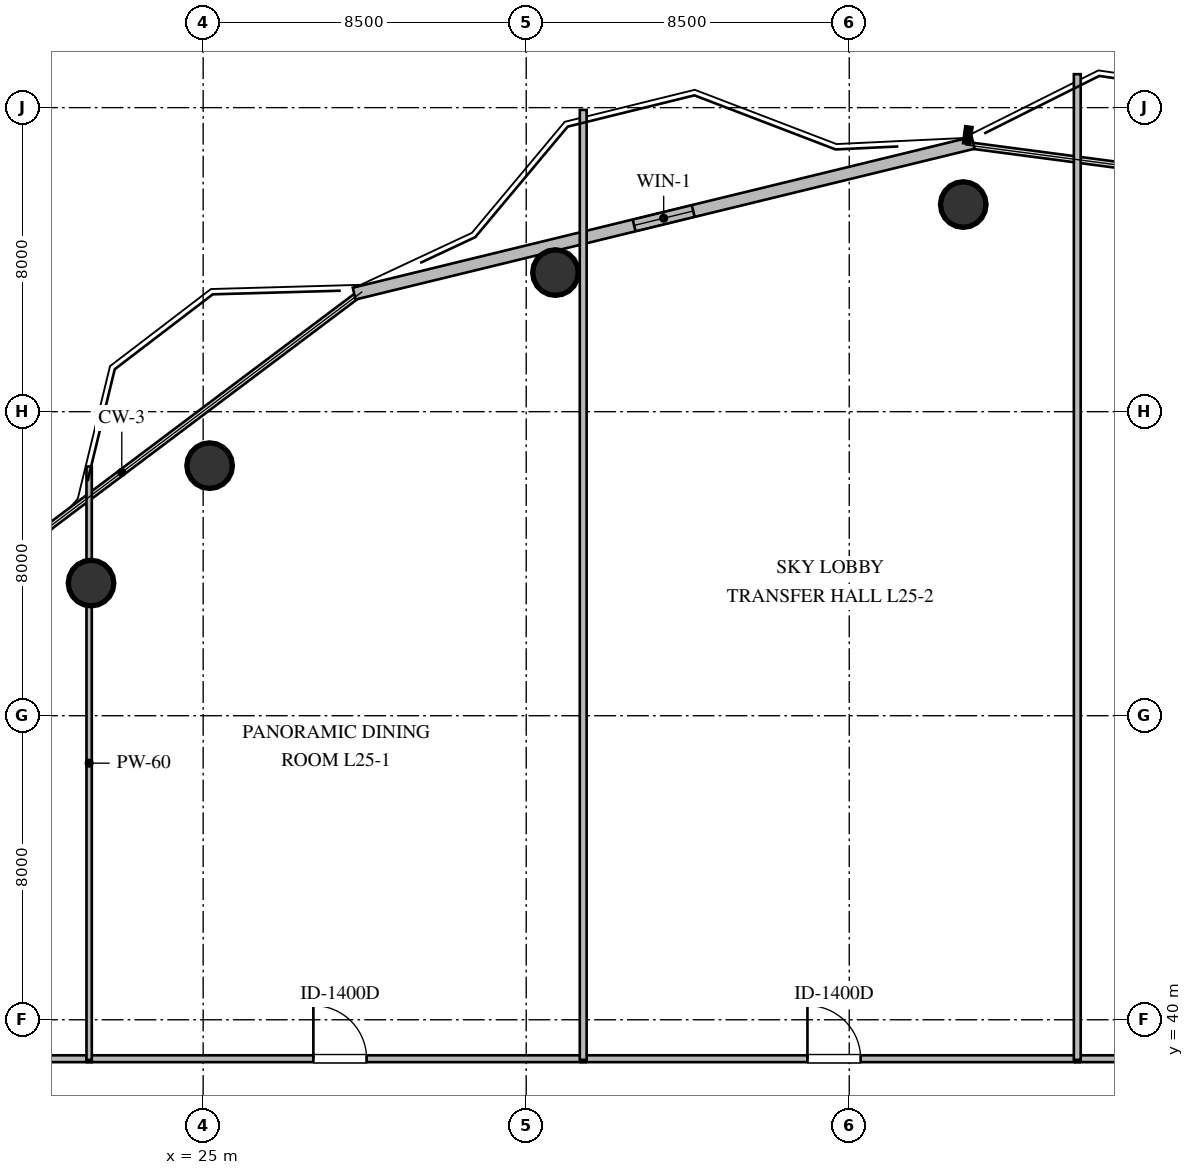
"""IFC4 building model, lengths in metres.
Left out: names, types, materials, properties, quantities, classifications, styles, units other than length and angle.
Written with IfcOpenShell. Run it as: python <this file> out.ifc"""

import sys

from ifc_helpers import new_model, si_unit, direction, frame, frame_2d, origin, origin_2d, place, context, subcontext, project, spatial, rectangle, circle, extrude, element, fill, save


model = new_model("IFC4")
c1 = context("Model", 3, precision=1e-05, world=origin(), true_north=direction((0.0, 1.0)))
c2 = subcontext(c1, "Body", "Model", "MODEL_VIEW")
j1 = project(units=[si_unit("LENGTHUNIT", "METRE"), si_unit("PLANEANGLEUNIT", "RADIAN")], contexts=[c1])
p1 = place(None, origin())
s1 = spatial("IfcSite", under=j1, at=p1, CompositionType="ELEMENT")
p2 = place(p1, origin())
s2 = spatial("IfcBuilding", under=s1, at=p2, CompositionType="ELEMENT")
p3 = place(p2, frame((0.0, 0.0, 97.8)))
s3 = spatial("IfcBuildingStorey", under=s2, at=p3, CompositionType="ELEMENT", Elevation=97.8)
for number, where, z_axis, x_axis in (
    (1, (45.0, 61.45, -0.32), (0.0, 0.0, 1.0), (1.0, 0.0, 0.0)),
    (2, (34.27, 59.66, -0.32), (0.0, 0.0, 1.0), (1.0, 0.0, 0.0)),
    (3, (25.17, 54.58, -0.32), (0.0, 0.0, 1.0), (1.0, 0.0, 0.0)),
    (4, (22.05, 51.49, -0.32), (0.0, 0.0, 1.0), (1.0, 0.0, 0.0)),
):
    element("IfcColumn", number, at=place(p3, frame(where, z_axis=z_axis, x_axis=x_axis)), inside=s3, PredefinedType="COLUMN", context=c2, shape_type="SweptSolid", body=[
        extrude(circle(Radius=0.6, at=origin_2d()), origin(), (0.0, 0.0, 1.0), 5.12),
    ])
p4 = place(p3, frame((28.974, 59.107, 0.0), z_axis=(0.0, 0.0, 1.0), x_axis=(0.971593971582, 0.236654081699, 0.0)))
e5 = element("IfcWall", 5, at=p4, inside=s3, PredefinedType="STANDARD", context=c2, shape_type="SweptSolid", body=[
    extrude(rectangle(XDim=16.763, YDim=0.32, at=frame_2d((8.381, 0.0))), origin(), (0.0, 0.0, 1.0), 4.56),
])
p5 = place(p4, frame((7.581, 0.0, 1.05)))
e6 = element("IfcOpeningElement", 6, at=p5, cuts=e5, PredefinedType="OPENING", context=c2, shape_type="SweptSolid", body=[
    extrude(rectangle(XDim=1.6, YDim=1.5, at=frame_2d((0.8, 0.75))), frame((0.0, 0.17, 0.0), z_axis=(0.0, -1.0, 0.0), x_axis=(1.0, 0.0, 0.0)), (0.0, 0.0, 1.0), 0.34),
])
p6 = place(p3, frame((15.065, 38.975, 0.0), z_axis=(0.0, 0.0, 1.0), x_axis=(1.0, 0.0, 0.0)))
e7 = element("IfcWall", 7, at=p6, inside=s3, PredefinedType="PARTITIONING", context=c2, shape_type="SweptSolid", body=[
    extrude(rectangle(XDim=7.0, YDim=0.18, at=frame_2d((3.5, 0.0))), origin(), (0.0, 0.0, 1.0), 4.56),
])
p7 = place(p6, frame((2.9, 0.0, 0.0)))
e8 = element("IfcOpeningElement", 8, at=p7, cuts=e7, PredefinedType="OPENING", context=c2, shape_type="SweptSolid", body=[
    extrude(rectangle(XDim=1.1, YDim=2.1, at=frame_2d((0.55, 1.05))), frame((0.0, 0.1, 0.0), z_axis=(0.0, -1.0, 0.0), x_axis=(1.0, 0.0, 0.0)), (0.0, 0.0, 1.0), 0.2),
])
p8 = place(p3, frame((21.935, 38.975, 0.0), z_axis=(0.0, 0.0, 1.0), x_axis=(1.0, 0.0, 0.0)))
e9 = element("IfcWall", 9, at=p8, inside=s3, PredefinedType="PARTITIONING", context=c2, shape_type="SweptSolid", body=[
    extrude(rectangle(XDim=13.13, YDim=0.18, at=frame_2d((6.565, 0.0))), origin(), (0.0, 0.0, 1.0), 4.56),
])
p9 = place(p8, frame((5.965, 0.0, 0.0)))
e10 = element("IfcOpeningElement", 10, at=p9, cuts=e9, PredefinedType="OPENING", context=c2, shape_type="SweptSolid", body=[
    extrude(rectangle(XDim=1.4, YDim=2.15, at=frame_2d((0.7, 1.075))), frame((0.0, 0.1, 0.0), z_axis=(0.0, -1.0, 0.0), x_axis=(1.0, 0.0, 0.0)), (0.0, 0.0, 1.0), 0.2),
])
p10 = place(p3, frame((34.935, 38.975, 0.0), z_axis=(0.0, 0.0, 1.0), x_axis=(1.0, 0.0, 0.0)))
e11 = element("IfcWall", 11, at=p10, inside=s3, PredefinedType="PARTITIONING", context=c2, shape_type="SweptSolid", body=[
    extrude(rectangle(XDim=13.13, YDim=0.18, at=frame_2d((6.565, 0.0))), origin(), (0.0, 0.0, 1.0), 4.56),
])
p11 = place(p10, frame((5.965, 0.0, 0.0)))
e12 = element("IfcOpeningElement", 12, at=p11, cuts=e11, PredefinedType="OPENING", context=c2, shape_type="SweptSolid", body=[
    extrude(rectangle(XDim=1.4, YDim=2.15, at=frame_2d((0.7, 1.075))), frame((0.0, 0.1, 0.0), z_axis=(0.0, -1.0, 0.0), x_axis=(1.0, 0.0, 0.0)), (0.0, 0.0, 1.0), 0.2),
])
p12 = place(p3, frame((47.935, 38.975, 0.0), z_axis=(0.0, 0.0, 1.0), x_axis=(1.0, 0.0, 0.0)))
e13 = element("IfcWall", 13, at=p12, inside=s3, PredefinedType="PARTITIONING", context=c2, shape_type="SweptSolid", body=[
    extrude(rectangle(XDim=12.13, YDim=0.18, at=frame_2d((6.065, 0.0))), origin(), (0.0, 0.0, 1.0), 4.56),
])
p13 = place(p12, frame((5.465, 0.0, 0.0)))
e14 = element("IfcOpeningElement", 14, at=p13, cuts=e13, PredefinedType="OPENING", context=c2, shape_type="SweptSolid", body=[
    extrude(rectangle(XDim=1.1, YDim=2.1, at=frame_2d((0.55, 1.05))), frame((0.0, 0.1, 0.0), z_axis=(0.0, -1.0, 0.0), x_axis=(1.0, 0.0, 0.0)), (0.0, 0.0, 1.0), 0.2),
])
p14 = place(p3, frame((22.0, 54.558, 0.0), z_axis=(0.0, 0.0, 1.0), x_axis=(0.0, -1.0, 0.0)))
e15 = element("IfcWall", 15, at=p14, inside=s3, PredefinedType="PARTITIONING", context=c2, shape_type="SweptSolid", body=[
    extrude(rectangle(XDim=15.613, YDim=0.14, at=frame_2d((7.807, 0.0))), origin(), (0.0, 0.0, 1.0), 4.09),
])
p15 = place(p3, frame((35.0, 63.941, 0.0), z_axis=(0.0, 0.0, 1.0), x_axis=(0.0, -1.0, 0.0)))
e16 = element("IfcWall", 16, at=p15, inside=s3, PredefinedType="PARTITIONING", context=c2, shape_type="SweptSolid", body=[
    extrude(rectangle(XDim=24.996, YDim=0.18, at=frame_2d((12.498, 0.0))), origin(), (0.0, 0.0, 1.0), 4.09),
])
p16 = place(p3, frame((48.0, 64.88, 0.0), z_axis=(0.0, 0.0, 1.0), x_axis=(0.0, -1.0, 0.0)))
e17 = element("IfcWall", 17, at=p16, inside=s3, PredefinedType="PARTITIONING", context=c2, shape_type="SweptSolid", body=[
    extrude(rectangle(XDim=25.935, YDim=0.18, at=frame_2d((12.967, 0.0))), origin(), (0.0, 0.0, 1.0), 4.56),
])
p17 = place(p5, origin())
e18 = element("IfcWindow", 18, at=p17, inside=s3, PartitioningType="SINGLE_PANEL", PredefinedType="WINDOW", context=c2, shape_type="SweptSolid", body=[
    extrude(rectangle(XDim=1.6, YDim=1.5, at=frame_2d((0.8, 0.75))), frame((0.0, 0.03, 0.0), z_axis=(0.0, -1.0, 0.0), x_axis=(1.0, 0.0, 0.0)), (0.0, 0.0, 1.0), 0.06),
])
fill(e6, e18)
p18 = place(p9, origin())
e19 = element("IfcDoor", 19, at=p18, inside=s3, OperationType="SINGLE_SWING_LEFT", PredefinedType="DOOR", context=c2, shape_type="SweptSolid", body=[
    extrude(rectangle(XDim=1.4, YDim=2.15, at=frame_2d((0.7, 1.075))), frame((0.0, 0.025, 0.0), z_axis=(0.0, -1.0, 0.0), x_axis=(1.0, 0.0, 0.0)), (0.0, 0.0, 1.0), 0.05),
])
fill(e10, e19)
p19 = place(p11, origin())
e20 = element("IfcDoor", 20, at=p19, inside=s3, OperationType="SINGLE_SWING_LEFT", PredefinedType="DOOR", context=c2, shape_type="SweptSolid", body=[
    extrude(rectangle(XDim=1.4, YDim=2.15, at=frame_2d((0.7, 1.075))), frame((0.0, 0.025, 0.0), z_axis=(0.0, -1.0, 0.0), x_axis=(1.0, 0.0, 0.0)), (0.0, 0.0, 1.0), 0.05),
])
fill(e12, e20)
save(model, sys.argv[1])
